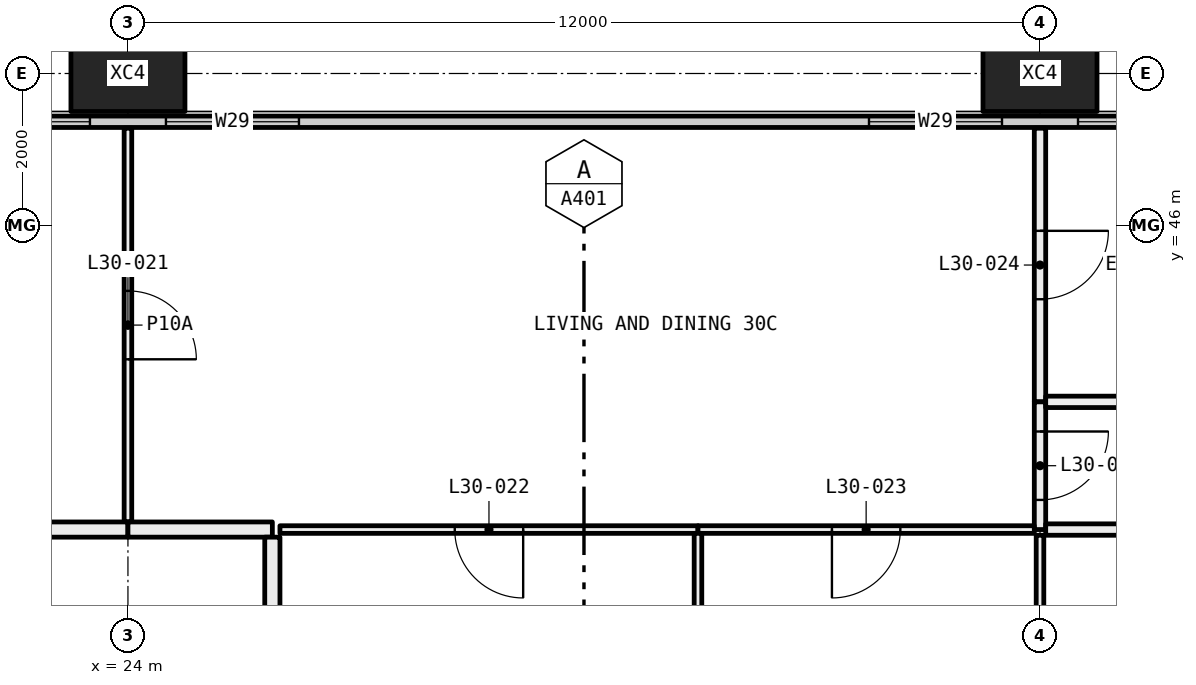
"""IFC4 building model, lengths in metres.
Left out: names, types, materials, properties, quantities, classifications, styles, units other than length and angle.
Written with IfcOpenShell. Run it as: python <this file> out.ifc"""

import sys

from ifc_helpers import new_model, si_unit, direction, frame, frame_2d, origin, origin_2d, place, context, subcontext, project, spatial, rectangle, hollow_rectangle, extrude, element, fill, save


model = new_model("IFC4")
c1 = context("Model", 3, precision=1e-05, world=origin(), true_north=direction((0.0, 1.0)))
c2 = subcontext(c1, "Body", "Model", "MODEL_VIEW")
j1 = project(units=[si_unit("LENGTHUNIT", "METRE"), si_unit("PLANEANGLEUNIT", "RADIAN")], contexts=[c1])
p1 = place(None, origin())
s1 = spatial("IfcSite", under=j1, at=p1, CompositionType="ELEMENT")
p2 = place(p1, origin())
s2 = spatial("IfcBuilding", under=s1, at=p2, CompositionType="ELEMENT")
p3 = place(p2, frame((0.0, 0.0, 117.3)))
s3 = spatial("IfcBuildingStorey", under=s2, at=p3, CompositionType="ELEMENT", Elevation=117.3)
for number, where, z_axis, x_axis in (
    (1, (24.0, 48.0, -0.4), (0.0, 0.0, 1.0), (1.0, 0.0, 0.0)),
    (2, (36.0, 48.0, -0.4), (0.0, 0.0, 1.0), (1.0, 0.0, 0.0)),
):
    element("IfcColumn", number, at=place(p3, frame(where, z_axis=z_axis, x_axis=x_axis)), inside=s3, PredefinedType="COLUMN", context=c2, shape_type="SweptSolid", body=[
        extrude(hollow_rectangle(XDim=1.5, YDim=1.0, WallThickness=0.06, at=origin_2d()), origin(), (0.0, 0.0, 1.0), 3.45),
    ])
p4 = place(p3, frame((6.56, 47.365, 0.0), z_axis=(0.0, 0.0, 1.0), x_axis=(1.0, 0.0, 0.0)))
e3 = element("IfcWall", 3, at=p4, inside=s3, PredefinedType="ELEMENTEDWALL", context=c2, shape_type="SweptSolid", body=[
    extrude(rectangle(XDim=58.88, YDim=0.15, at=frame_2d((29.44, 0.0))), origin(), (0.0, 0.0, 1.0), 3.05),
])
p5 = place(p4, frame((0.44, 0.0, 0.45)))
e4 = element("IfcOpeningElement", 4, at=p5, cuts=e3, PredefinedType="OPENING", context=c2, shape_type="SweptSolid", body=[
    extrude(rectangle(XDim=4.5, YDim=2.55, at=frame_2d((2.25, 1.275))), frame((0.0, 0.085, 0.0), z_axis=(0.0, -1.0, 0.0), x_axis=(1.0, 0.0, 0.0)), (0.0, 0.0, 1.0), 0.17),
])
p6 = place(p4, frame((5.94, 0.0, 0.45)))
e5 = element("IfcOpeningElement", 5, at=p6, cuts=e3, PredefinedType="OPENING", context=c2, shape_type="SweptSolid", body=[
    extrude(rectangle(XDim=1.75, YDim=2.55, at=frame_2d((0.875, 1.275))), frame((0.0, 0.085, 0.0), z_axis=(0.0, -1.0, 0.0), x_axis=(1.0, 0.0, 0.0)), (0.0, 0.0, 1.0), 0.17),
])
p7 = place(p4, frame((15.19, 0.0, 0.45)))
e6 = element("IfcOpeningElement", 6, at=p7, cuts=e3, PredefinedType="OPENING", context=c2, shape_type="SweptSolid", body=[
    extrude(rectangle(XDim=1.75, YDim=2.55, at=frame_2d((0.875, 1.275))), frame((0.0, 0.085, 0.0), z_axis=(0.0, -1.0, 0.0), x_axis=(1.0, 0.0, 0.0)), (0.0, 0.0, 1.0), 0.17),
])
p8 = place(p4, frame((17.94, 0.0, 0.45)))
e7 = element("IfcOpeningElement", 7, at=p8, cuts=e3, PredefinedType="OPENING", context=c2, shape_type="SweptSolid", body=[
    extrude(rectangle(XDim=1.75, YDim=2.55, at=frame_2d((0.875, 1.275))), frame((0.0, 0.085, 0.0), z_axis=(0.0, -1.0, 0.0), x_axis=(1.0, 0.0, 0.0)), (0.0, 0.0, 1.0), 0.17),
])
p9 = place(p4, frame((27.19, 0.0, 0.45)))
e8 = element("IfcOpeningElement", 8, at=p9, cuts=e3, PredefinedType="OPENING", context=c2, shape_type="SweptSolid", body=[
    extrude(rectangle(XDim=1.75, YDim=2.55, at=frame_2d((0.875, 1.275))), frame((0.0, 0.085, 0.0), z_axis=(0.0, -1.0, 0.0), x_axis=(1.0, 0.0, 0.0)), (0.0, 0.0, 1.0), 0.17),
])
p10 = place(p4, frame((29.94, 0.0, 0.45)))
e9 = element("IfcOpeningElement", 9, at=p10, cuts=e3, PredefinedType="OPENING", context=c2, shape_type="SweptSolid", body=[
    extrude(rectangle(XDim=1.75, YDim=2.55, at=frame_2d((0.875, 1.275))), frame((0.0, 0.085, 0.0), z_axis=(0.0, -1.0, 0.0), x_axis=(1.0, 0.0, 0.0)), (0.0, 0.0, 1.0), 0.17),
])
p11 = place(p4, frame((39.19, 0.0, 0.45)))
e10 = element("IfcOpeningElement", 10, at=p11, cuts=e3, PredefinedType="OPENING", context=c2, shape_type="SweptSolid", body=[
    extrude(rectangle(XDim=1.75, YDim=2.55, at=frame_2d((0.875, 1.275))), frame((0.0, 0.085, 0.0), z_axis=(0.0, -1.0, 0.0), x_axis=(1.0, 0.0, 0.0)), (0.0, 0.0, 1.0), 0.17),
])
p12 = place(p4, frame((41.94, 0.0, 0.45)))
e11 = element("IfcOpeningElement", 11, at=p12, cuts=e3, PredefinedType="OPENING", context=c2, shape_type="SweptSolid", body=[
    extrude(rectangle(XDim=1.75, YDim=2.55, at=frame_2d((0.875, 1.275))), frame((0.0, 0.085, 0.0), z_axis=(0.0, -1.0, 0.0), x_axis=(1.0, 0.0, 0.0)), (0.0, 0.0, 1.0), 0.17),
])
p13 = place(p4, frame((51.19, 0.0, 0.45)))
e12 = element("IfcOpeningElement", 12, at=p13, cuts=e3, PredefinedType="OPENING", context=c2, shape_type="SweptSolid", body=[
    extrude(rectangle(XDim=1.75, YDim=2.55, at=frame_2d((0.875, 1.275))), frame((0.0, 0.085, 0.0), z_axis=(0.0, -1.0, 0.0), x_axis=(1.0, 0.0, 0.0)), (0.0, 0.0, 1.0), 0.17),
])
p14 = place(p4, frame((53.94, 0.0, 0.45)))
e13 = element("IfcOpeningElement", 13, at=p14, cuts=e3, PredefinedType="OPENING", context=c2, shape_type="SweptSolid", body=[
    extrude(rectangle(XDim=4.5, YDim=2.55, at=frame_2d((2.25, 1.275))), frame((0.0, 0.085, 0.0), z_axis=(0.0, -1.0, 0.0), x_axis=(1.0, 0.0, 0.0)), (0.0, 0.0, 1.0), 0.17),
])
p15 = place(p3, frame((24.0, 42.1, 0.0), z_axis=(0.0, 0.0, 1.0), x_axis=(0.0, 1.0, 0.0)))
e14 = element("IfcWall", 14, at=p15, inside=s3, PredefinedType="PARTITIONING", context=c2, shape_type="SweptSolid", body=[
    extrude(rectangle(XDim=5.18, YDim=0.1, at=frame_2d((2.59, 0.0))), origin(), (0.0, 0.0, 1.0), 3.05),
])
p16 = place(p15, frame((2.14, 0.0, 0.0)))
e15 = element("IfcOpeningElement", 15, at=p16, cuts=e14, PredefinedType="OPENING", context=c2, shape_type="SweptSolid", body=[
    extrude(rectangle(XDim=0.9, YDim=2.1, at=frame_2d((0.45, 1.05))), frame((0.0, 0.06, 0.0), z_axis=(0.0, -1.0, 0.0), x_axis=(1.0, 0.0, 0.0)), (0.0, 0.0, 1.0), 0.12),
])
p17 = place(p3, frame((18.0, 42.0, 0.0), z_axis=(0.0, 0.0, 1.0), x_axis=(1.0, 0.0, 0.0)))
e16 = element("IfcWall", 16, at=p17, inside=s3, PredefinedType="PARTITIONING", context=c2, shape_type="SweptSolid", body=[
    extrude(rectangle(XDim=6.0, YDim=0.2, at=frame_2d((3.0, 0.0))), origin(), (0.0, 0.0, 1.0), 3.05),
])
p18 = place(p17, frame((2.5, 0.0, 0.0)))
e17 = element("IfcOpeningElement", 17, at=p18, cuts=e16, PredefinedType="OPENING", context=c2, shape_type="SweptSolid", body=[
    extrude(rectangle(XDim=1.0, YDim=2.1, at=frame_2d((0.5, 1.05))), frame((0.0, 0.11, 0.0), z_axis=(0.0, -1.0, 0.0), x_axis=(1.0, 0.0, 0.0)), (0.0, 0.0, 1.0), 0.22),
])
p19 = place(p3, frame((36.0, 43.68, 0.0), z_axis=(0.0, 0.0, 1.0), x_axis=(0.0, 1.0, 0.0)))
e18 = element("IfcWall", 18, at=p19, inside=s3, PredefinedType="PARTITIONING", context=c2, shape_type="SweptSolid", body=[
    extrude(rectangle(XDim=3.6, YDim=0.15, at=frame_2d((1.8, 0.0))), origin(), (0.0, 0.0, 1.0), 2.45),
])
p20 = place(p19, frame((1.35, 0.0, 0.0)))
e19 = element("IfcOpeningElement", 19, at=p20, cuts=e18, PredefinedType="OPENING", context=c2, shape_type="SweptSolid", body=[
    extrude(rectangle(XDim=0.9, YDim=2.1, at=frame_2d((0.45, 1.05))), frame((0.0, 0.085, 0.0), z_axis=(0.0, -1.0, 0.0), x_axis=(1.0, 0.0, 0.0)), (0.0, 0.0, 1.0), 0.17),
])
p21 = place(p3, frame((36.0, 42.0, 0.0), z_axis=(0.0, 0.0, 1.0), x_axis=(0.0, 1.0, 0.0)))
e20 = element("IfcWall", 20, at=p21, inside=s3, PredefinedType="PARTITIONING", context=c2, shape_type="SweptSolid", body=[
    extrude(rectangle(XDim=1.68, YDim=0.15, at=frame_2d((0.84, 0.0))), origin(), (0.0, 0.0, 1.0), 2.45),
])
p22 = place(p21, frame((0.39, 0.0, 0.0)))
e21 = element("IfcOpeningElement", 21, at=p22, cuts=e20, PredefinedType="OPENING", context=c2, shape_type="SweptSolid", body=[
    extrude(rectangle(XDim=0.9, YDim=2.1, at=frame_2d((0.45, 1.05))), frame((0.0, 0.085, 0.0), z_axis=(0.0, -1.0, 0.0), x_axis=(1.0, 0.0, 0.0)), (0.0, 0.0, 1.0), 0.17),
])
p23 = place(p3, frame((26.0, 42.0, 0.0), z_axis=(0.0, 0.0, 1.0), x_axis=(1.0, 0.0, 0.0)))
e22 = element("IfcWall", 22, at=p23, inside=s3, PredefinedType="PARTITIONING", context=c2, shape_type="SweptSolid", body=[
    extrude(rectangle(XDim=5.5, YDim=0.1, at=frame_2d((2.75, 0.0))), origin(), (0.0, 0.0, 1.0), 3.05),
])
p24 = place(p23, frame((2.3, 0.0, 0.0)))
e23 = element("IfcOpeningElement", 23, at=p24, cuts=e22, PredefinedType="OPENING", context=c2, shape_type="SweptSolid", body=[
    extrude(rectangle(XDim=0.9, YDim=2.1, at=frame_2d((0.45, 1.05))), frame((0.0, 0.06, 0.0), z_axis=(0.0, -1.0, 0.0), x_axis=(1.0, 0.0, 0.0)), (0.0, 0.0, 1.0), 0.12),
])
p25 = place(p3, frame((31.5, 42.0, 0.0), z_axis=(0.0, 0.0, 1.0), x_axis=(1.0, 0.0, 0.0)))
e24 = element("IfcWall", 24, at=p25, inside=s3, PredefinedType="PARTITIONING", context=c2, shape_type="SweptSolid", body=[
    extrude(rectangle(XDim=4.425, YDim=0.1, at=frame_2d((2.212, 0.0))), origin(), (0.0, 0.0, 1.0), 2.45),
])
p26 = place(p25, frame((1.762, 0.0, 0.0)))
e25 = element("IfcOpeningElement", 25, at=p26, cuts=e24, PredefinedType="OPENING", context=c2, shape_type="SweptSolid", body=[
    extrude(rectangle(XDim=0.9, YDim=2.1, at=frame_2d((0.45, 1.05))), frame((0.0, 0.06, 0.0), z_axis=(0.0, -1.0, 0.0), x_axis=(1.0, 0.0, 0.0)), (0.0, 0.0, 1.0), 0.12),
])
p27 = place(p3, frame((24.0, 42.0, 0.0), z_axis=(0.0, 0.0, 1.0), x_axis=(1.0, 0.0, 0.0)))
e26 = element("IfcWall", 26, at=p27, inside=s3, PredefinedType="PARTITIONING", context=c2, shape_type="SweptSolid", body=[
    extrude(rectangle(XDim=1.9, YDim=0.2, at=frame_2d((0.95, 0.0))), origin(), (0.0, 0.0, 1.0), 3.05),
])
for number, where, z_axis, x_axis in (
    (27, (36.075, 43.68, 0.0), (0.0, 0.0, 1.0), (1.0, 0.0, 0.0)),
    (28, (36.075, 42.0, 0.0), (0.0, 0.0, 1.0), (1.0, 0.0, 0.0)),
):
    element("IfcWall", number, at=place(p3, frame(where, z_axis=z_axis, x_axis=x_axis)), inside=s3, PredefinedType="PARTITIONING", context=c2, shape_type="SweptSolid", body=[
        extrude(rectangle(XDim=5.825, YDim=0.15, at=frame_2d((2.913, 0.0))), origin(), (0.0, 0.0, 1.0), 2.45),
    ])
p28 = place(p3, frame((31.5, 36.1, 0.0), z_axis=(0.0, 0.0, 1.0), x_axis=(0.0, 1.0, 0.0)))
e29 = element("IfcWall", 29, at=p28, inside=s3, PredefinedType="PARTITIONING", context=c2, shape_type="SweptSolid", body=[
    extrude(rectangle(XDim=5.85, YDim=0.1, at=frame_2d((2.925, 0.0))), origin(), (0.0, 0.0, 1.0), 3.05),
])
p29 = place(p3, frame((25.9, 41.9, 0.0), z_axis=(0.0, 0.0, 1.0), x_axis=(0.0, -1.0, 0.0)))
e30 = element("IfcWall", 30, at=p29, inside=s3, PredefinedType="PARTITIONING", context=c2, shape_type="SweptSolid", body=[
    extrude(rectangle(XDim=6.2, YDim=0.2, at=frame_2d((3.1, 0.0))), origin(), (0.0, 0.0, 1.0), 2.45),
])
p30 = place(p3, frame((36.0, 36.75, 0.0), z_axis=(0.0, 0.0, 1.0), x_axis=(0.0, 1.0, 0.0)))
e31 = element("IfcWall", 31, at=p30, inside=s3, PredefinedType="PARTITIONING", context=c2, shape_type="SweptSolid", body=[
    extrude(rectangle(XDim=5.175, YDim=0.1, at=frame_2d((2.587, 0.0))), origin(), (0.0, 0.0, 1.0), 2.45),
])
p31 = place(p30, frame((2.137, 0.0, 0.0)))
e32 = element("IfcOpeningElement", 32, at=p31, cuts=e31, PredefinedType="OPENING", context=c2, shape_type="SweptSolid", body=[
    extrude(rectangle(XDim=0.9, YDim=2.1, at=frame_2d((0.45, 1.05))), frame((0.0, 0.06, 0.0), z_axis=(0.0, -1.0, 0.0), x_axis=(1.0, 0.0, 0.0)), (0.0, 0.0, 1.0), 0.12),
])
p32 = place(p7, origin())
e33 = element("IfcWindow", 33, at=p32, inside=s3, PartitioningType="SINGLE_PANEL", PredefinedType="WINDOW", context=c2, shape_type="SweptSolid", body=[
    extrude(rectangle(XDim=1.75, YDim=2.55, at=frame_2d((0.875, 1.275))), frame((0.0, 0.03, 0.0), z_axis=(0.0, -1.0, 0.0), x_axis=(1.0, 0.0, 0.0)), (0.0, 0.0, 1.0), 0.06),
])
fill(e6, e33)
p33 = place(p8, origin())
e34 = element("IfcWindow", 34, at=p33, inside=s3, PartitioningType="SINGLE_PANEL", PredefinedType="WINDOW", context=c2, shape_type="SweptSolid", body=[
    extrude(rectangle(XDim=1.75, YDim=2.55, at=frame_2d((0.875, 1.275))), frame((0.0, 0.03, 0.0), z_axis=(0.0, -1.0, 0.0), x_axis=(1.0, 0.0, 0.0)), (0.0, 0.0, 1.0), 0.06),
])
fill(e7, e34)
p34 = place(p9, origin())
e35 = element("IfcWindow", 35, at=p34, inside=s3, PartitioningType="SINGLE_PANEL", PredefinedType="WINDOW", context=c2, shape_type="SweptSolid", body=[
    extrude(rectangle(XDim=1.75, YDim=2.55, at=frame_2d((0.875, 1.275))), frame((0.0, 0.03, 0.0), z_axis=(0.0, -1.0, 0.0), x_axis=(1.0, 0.0, 0.0)), (0.0, 0.0, 1.0), 0.06),
])
fill(e8, e35)
p35 = place(p10, origin())
e36 = element("IfcWindow", 36, at=p35, inside=s3, PartitioningType="SINGLE_PANEL", PredefinedType="WINDOW", context=c2, shape_type="SweptSolid", body=[
    extrude(rectangle(XDim=1.75, YDim=2.55, at=frame_2d((0.875, 1.275))), frame((0.0, 0.03, 0.0), z_axis=(0.0, -1.0, 0.0), x_axis=(1.0, 0.0, 0.0)), (0.0, 0.0, 1.0), 0.06),
])
fill(e9, e36)
p36 = place(p16, frame((0.9, 0.0, 0.0), x_axis=(-1.0, 0.0, 0.0)))
e37 = element("IfcDoor", 37, at=p36, inside=s3, OperationType="SINGLE_SWING_LEFT", PredefinedType="DOOR", context=c2, shape_type="SweptSolid", body=[
    extrude(rectangle(XDim=0.9, YDim=2.1, at=frame_2d((0.45, 1.05))), frame((0.0, 0.025, 0.0), z_axis=(0.0, -1.0, 0.0), x_axis=(1.0, 0.0, 0.0)), (0.0, 0.0, 1.0), 0.05),
])
fill(e15, e37)
p37 = place(p24, frame((0.9, 0.0, 0.0), x_axis=(-1.0, 0.0, 0.0)))
e38 = element("IfcDoor", 38, at=p37, inside=s3, OperationType="SINGLE_SWING_RIGHT", PredefinedType="DOOR", context=c2, shape_type="SweptSolid", body=[
    extrude(rectangle(XDim=0.9, YDim=2.1, at=frame_2d((0.45, 1.05))), frame((0.0, 0.025, 0.0), z_axis=(0.0, -1.0, 0.0), x_axis=(1.0, 0.0, 0.0)), (0.0, 0.0, 1.0), 0.05),
])
fill(e23, e38)
p38 = place(p26, frame((0.9, 0.0, 0.0), x_axis=(-1.0, 0.0, 0.0)))
e39 = element("IfcDoor", 39, at=p38, inside=s3, OperationType="SINGLE_SWING_LEFT", PredefinedType="DOOR", context=c2, shape_type="SweptSolid", body=[
    extrude(rectangle(XDim=0.9, YDim=2.1, at=frame_2d((0.45, 1.05))), frame((0.0, 0.025, 0.0), z_axis=(0.0, -1.0, 0.0), x_axis=(1.0, 0.0, 0.0)), (0.0, 0.0, 1.0), 0.05),
])
fill(e25, e39)
p39 = place(p20, frame((0.9, 0.0, 0.0), x_axis=(-1.0, 0.0, 0.0)))
e40 = element("IfcDoor", 40, at=p39, inside=s3, OperationType="SINGLE_SWING_RIGHT", PredefinedType="DOOR", context=c2, shape_type="SweptSolid", body=[
    extrude(rectangle(XDim=0.9, YDim=2.1, at=frame_2d((0.45, 1.05))), frame((0.0, 0.025, 0.0), z_axis=(0.0, -1.0, 0.0), x_axis=(1.0, 0.0, 0.0)), (0.0, 0.0, 1.0), 0.05),
])
fill(e19, e40)
p40 = place(p22, frame((0.9, 0.0, 0.0), x_axis=(-1.0, 0.0, 0.0)))
e41 = element("IfcDoor", 41, at=p40, inside=s3, OperationType="SINGLE_SWING_RIGHT", PredefinedType="DOOR", context=c2, shape_type="SweptSolid", body=[
    extrude(rectangle(XDim=0.9, YDim=2.1, at=frame_2d((0.45, 1.05))), frame((0.0, 0.025, 0.0), z_axis=(0.0, -1.0, 0.0), x_axis=(1.0, 0.0, 0.0)), (0.0, 0.0, 1.0), 0.05),
])
fill(e21, e41)
save(model, sys.argv[1])
